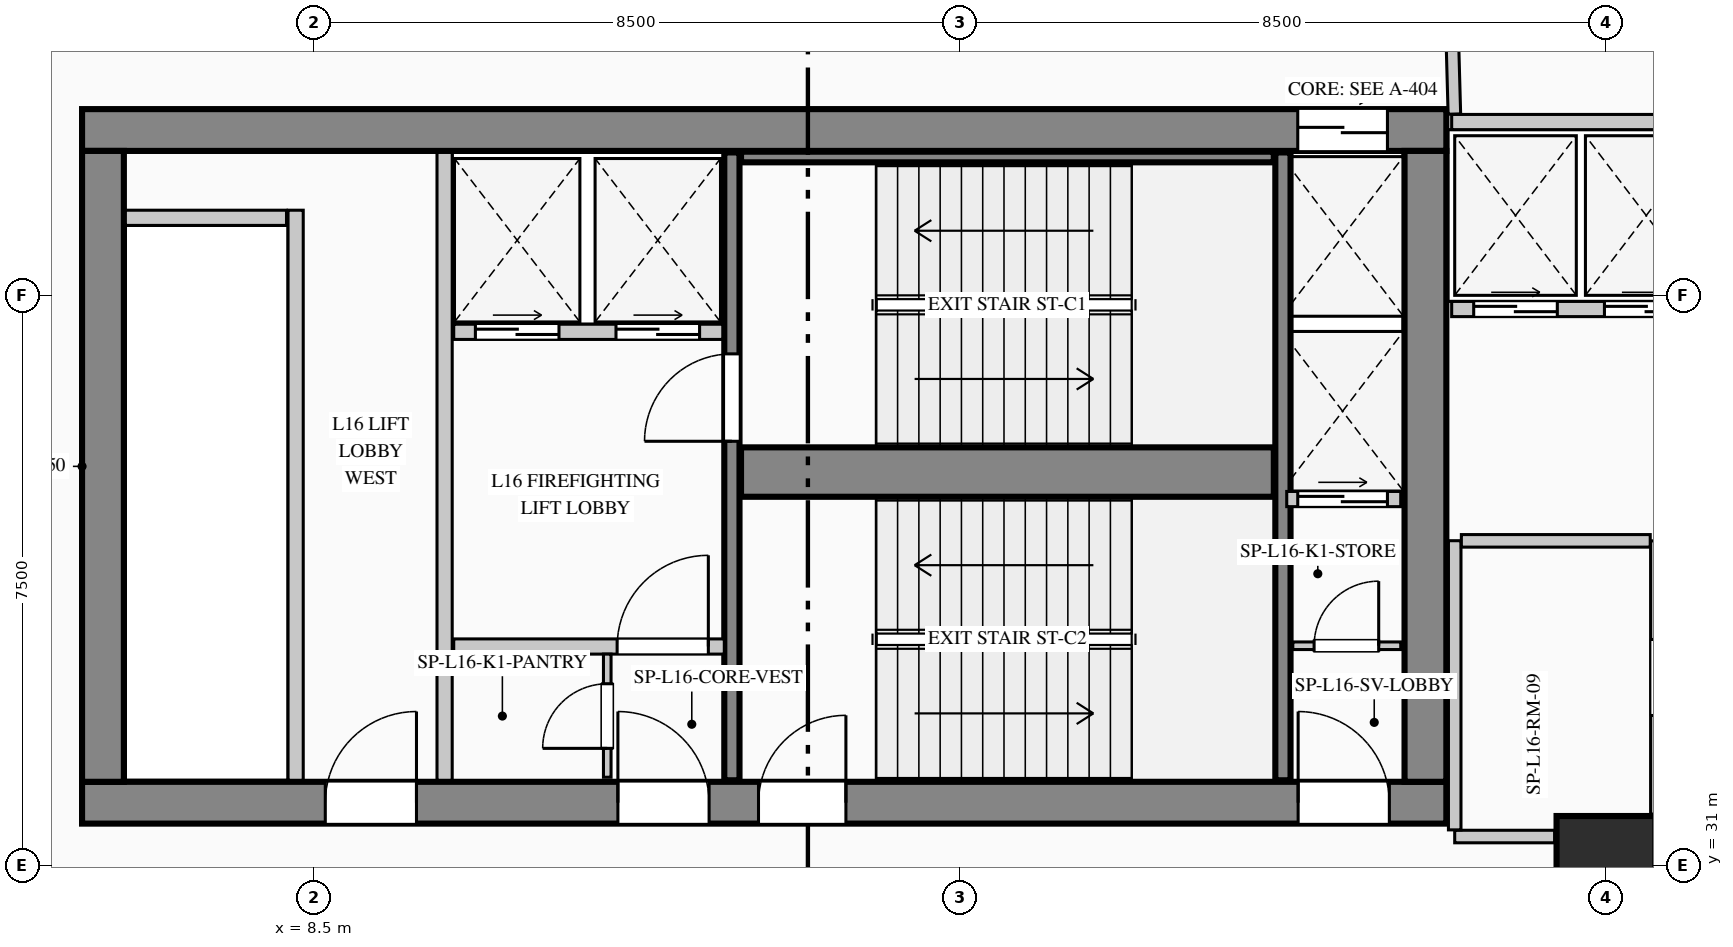
"""IFC4 building model, lengths in metres.
Left out: names, types, materials, properties, quantities, classifications, styles, units other than length and angle.
Written with IfcOpenShell. Run it as: python <this file> out.ifc"""

import sys

from ifc_helpers import new_model, si_unit, direction, frame, frame_2d, origin, origin_2d, place, context, subcontext, project, spatial, rectangle, extrude, element, fill, save


model = new_model("IFC4")
c1 = context("Model", 3, precision=1e-05, world=origin(), true_north=direction((0.0, 1.0)))
c2 = subcontext(c1, "Body", "Model", "MODEL_VIEW")
j1 = project(units=[si_unit("LENGTHUNIT", "METRE"), si_unit("PLANEANGLEUNIT", "RADIAN")], contexts=[c1])
p1 = place(None, origin())
s1 = spatial("IfcSite", under=j1, at=p1, CompositionType="ELEMENT")
p2 = place(p1, origin())
s2 = spatial("IfcBuilding", under=s1, at=p2, CompositionType="ELEMENT")
p3 = place(p2, frame((0.0, 0.0, 71.0)))
s3 = spatial("IfcBuildingStorey", under=s2, at=p3, CompositionType="ELEMENT", Elevation=71.0)
p4 = place(p3, frame((5.45, 40.675, 0.0), z_axis=(0.0, 0.0, 1.0), x_axis=(1.0, 0.0, 0.0)))
e1 = element("IfcWall", 1, at=p4, inside=s3, PredefinedType="SHEAR", context=c2, shape_type="SweptSolid", body=[
    extrude(rectangle(XDim=17.95, YDim=0.55, at=frame_2d((8.975, 0.0))), origin(), (0.0, 0.0, 1.0), 4.4),
])
p5 = place(p4, frame((15.995, 0.0, 0.0)))
e2 = element("IfcOpeningElement", 2, at=p5, cuts=e1, PredefinedType="OPENING", context=c2, shape_type="SweptSolid", body=[
    extrude(rectangle(XDim=1.18, YDim=2.25, at=frame_2d((0.59, 1.125))), frame((0.0, 0.285, 0.0), z_axis=(0.0, -1.0, 0.0), x_axis=(1.0, 0.0, 0.0)), (0.0, 0.0, 1.0), 0.57),
])
p6 = place(p3, frame((5.45, 31.825, 0.0), z_axis=(0.0, 0.0, 1.0), x_axis=(1.0, 0.0, 0.0)))
e3 = element("IfcWall", 3, at=p6, inside=s3, PredefinedType="SHEAR", context=c2, shape_type="SweptSolid", body=[
    extrude(rectangle(XDim=17.95, YDim=0.55, at=frame_2d((8.975, 0.0))), origin(), (0.0, 0.0, 1.0), 4.4),
])
p7 = place(p6, frame((3.2, 0.0, 0.0)))
e4 = element("IfcOpeningElement", 4, at=p7, cuts=e3, PredefinedType="OPENING", context=c2, shape_type="SweptSolid", body=[
    extrude(rectangle(XDim=1.2, YDim=2.2, at=frame_2d((0.6, 1.1))), frame((0.0, 0.285, 0.0), z_axis=(0.0, -1.0, 0.0), x_axis=(1.0, 0.0, 0.0)), (0.0, 0.0, 1.0), 0.57),
])
p8 = place(p6, frame((7.05, 0.0, 0.0)))
e5 = element("IfcOpeningElement", 5, at=p8, cuts=e3, PredefinedType="OPENING", context=c2, shape_type="SweptSolid", body=[
    extrude(rectangle(XDim=1.2, YDim=2.2, at=frame_2d((0.6, 1.1))), frame((0.0, 0.285, 0.0), z_axis=(0.0, -1.0, 0.0), x_axis=(1.0, 0.0, 0.0)), (0.0, 0.0, 1.0), 0.57),
])
p9 = place(p6, frame((8.9, 0.0, 0.0)))
e6 = element("IfcOpeningElement", 6, at=p9, cuts=e3, PredefinedType="OPENING", context=c2, shape_type="SweptSolid", body=[
    extrude(rectangle(XDim=1.15, YDim=2.2, at=frame_2d((0.575, 1.1))), frame((0.0, 0.285, 0.0), z_axis=(0.0, -1.0, 0.0), x_axis=(1.0, 0.0, 0.0)), (0.0, 0.0, 1.0), 0.57),
])
p10 = place(p6, frame((16.0, 0.0, 0.0)))
e7 = element("IfcOpeningElement", 7, at=p10, cuts=e3, PredefinedType="OPENING", context=c2, shape_type="SweptSolid", body=[
    extrude(rectangle(XDim=1.2, YDim=2.2, at=frame_2d((0.6, 1.1))), frame((0.0, 0.285, 0.0), z_axis=(0.0, -1.0, 0.0), x_axis=(1.0, 0.0, 0.0)), (0.0, 0.0, 1.0), 0.57),
])
for number, where, z_axis, x_axis in (
    (8, (5.725, 32.1, 0.0), (0.0, 0.0, 1.0), (0.0, 1.0, 0.0)),
    (9, (23.125, 32.1, 0.0), (0.0, 0.0, 1.0), (0.0, 1.0, 0.0)),
):
    element("IfcWall", number, at=place(p3, frame(where, z_axis=z_axis, x_axis=x_axis)), inside=s3, PredefinedType="SHEAR", context=c2, shape_type="SweptSolid", body=[
        extrude(rectangle(XDim=8.3, YDim=0.55, at=frame_2d((4.15, 0.0))), origin(), (0.0, 0.0, 1.0), 4.4),
    ])
p11 = place(p3, frame((14.0, 32.12, 0.0), z_axis=(0.0, 0.0, 1.0), x_axis=(0.0, 1.0, 0.0)))
e10 = element("IfcWall", 10, at=p11, inside=s3, PredefinedType="SHEAR", context=c2, shape_type="SweptSolid", body=[
    extrude(rectangle(XDim=8.26, YDim=0.2, at=frame_2d((4.13, 0.0))), origin(), (0.0, 0.0, 1.0), 4.4),
])
p12 = place(p11, frame((4.46, 0.0, 0.0)))
e11 = element("IfcOpeningElement", 11, at=p12, cuts=e10, PredefinedType="OPENING", context=c2, shape_type="SweptSolid", body=[
    extrude(rectangle(XDim=1.15, YDim=2.2, at=frame_2d((0.575, 1.1))), frame((0.0, 0.11, 0.0), z_axis=(0.0, -1.0, 0.0), x_axis=(1.0, 0.0, 0.0)), (0.0, 0.0, 1.0), 0.22),
])
p13 = place(p3, frame((14.12, 36.175, 0.0), z_axis=(0.0, 0.0, 1.0), x_axis=(1.0, 0.0, 0.0)))
e12 = element("IfcWall", 12, at=p13, inside=s3, PredefinedType="SHEAR", context=c2, shape_type="SweptSolid", body=[
    extrude(rectangle(XDim=7.01, YDim=0.65, at=frame_2d((3.505, 0.0))), origin(), (0.0, 0.0, 1.0), 4.4),
])
p14 = place(p3, frame((21.25, 32.12, 0.0), z_axis=(0.0, 0.0, 1.0), x_axis=(0.0, 1.0, 0.0)))
e13 = element("IfcWall", 13, at=p14, inside=s3, PredefinedType="SHEAR", context=c2, shape_type="SweptSolid", body=[
    extrude(rectangle(XDim=8.26, YDim=0.2, at=frame_2d((4.13, 0.0))), origin(), (0.0, 0.0, 1.0), 4.4),
])
p15 = place(p3, frame((14.12, 40.32, 0.0), z_axis=(0.0, 0.0, 1.0), x_axis=(1.0, 0.0, 0.0)))
e14 = element("IfcWall", 14, at=p15, inside=s3, PredefinedType="SHEAR", context=c2, shape_type="SweptSolid", body=[
    extrude(rectangle(XDim=7.01, YDim=0.14, at=frame_2d((3.505, 0.0))), origin(), (0.0, 0.0, 1.0), 4.4),
])
p16 = place(p3, frame((25.5, 31.0, 0.0), z_axis=(0.0, 0.0, 1.0), x_axis=(1.0, 0.0, 0.0)))
e15 = element("IfcColumn", 15, at=p16, inside=s3, PredefinedType="COLUMN", context=c2, shape_type="SweptSolid", body=[
    extrude(rectangle(XDim=1.3, YDim=1.3, at=origin_2d()), origin(), (0.0, 0.0, 1.0), 4.4),
])
p17 = place(p3, frame((8.523, 4.84, 0.0), z_axis=(0.0, 0.0, 1.0), x_axis=(-0.150394554312, 0.988626055712, 0.0)))
e16 = element("IfcWall", 16, at=p17, inside=s3, PredefinedType="STANDARD", context=c2, shape_type="SweptSolid", body=[
    extrude(rectangle(XDim=36.738, YDim=0.28, at=frame_2d((18.369, 0.0))), origin(), (0.0, 0.0, 1.0), 4.1),
])
p18 = place(p17, frame((22.612, 0.0, 0.9)))
e17 = element("IfcOpeningElement", 17, at=p18, cuts=e16, PredefinedType="OPENING", context=c2, shape_type="SweptSolid", body=[
    extrude(rectangle(XDim=1.8, YDim=2.1, at=frame_2d((0.9, 1.05))), frame((0.0, 0.15, 0.0), z_axis=(0.0, -1.0, 0.0), x_axis=(1.0, 0.0, 0.0)), (0.0, 0.0, 1.0), 0.3),
])
p19 = place(p3, frame((8.26, 32.12, 0.0), z_axis=(0.0, 0.0, 1.0), x_axis=(0.0, 1.0, 0.0)))
e18 = element("IfcWall", 18, at=p19, inside=s3, PredefinedType="PARTITIONING", context=c2, shape_type="SweptSolid", body=[
    extrude(rectangle(XDim=7.5, YDim=0.2, at=frame_2d((3.75, 0.0))), origin(), (0.0, 0.0, 1.0), 4.1),
])
p20 = place(p3, frame((6.02, 39.52, 0.0), z_axis=(0.0, 0.0, 1.0), x_axis=(1.0, 0.0, 0.0)))
e19 = element("IfcWall", 19, at=p20, inside=s3, PredefinedType="PARTITIONING", context=c2, shape_type="SweptSolid", body=[
    extrude(rectangle(XDim=2.12, YDim=0.2, at=frame_2d((1.06, 0.0))), origin(), (0.0, 0.0, 1.0), 4.1),
])
p21 = place(p3, frame((10.22, 32.12, 0.0), z_axis=(0.0, 0.0, 1.0), x_axis=(0.0, 1.0, 0.0)))
e20 = element("IfcWall", 20, at=p21, inside=s3, PredefinedType="PARTITIONING", context=c2, shape_type="SweptSolid", body=[
    extrude(rectangle(XDim=8.26, YDim=0.2, at=frame_2d((4.13, 0.0))), origin(), (0.0, 0.0, 1.0), 4.1),
])
p22 = place(p3, frame((10.34, 38.02, 0.0), z_axis=(0.0, 0.0, 1.0), x_axis=(1.0, 0.0, 0.0)))
e21 = element("IfcWall", 21, at=p22, inside=s3, PredefinedType="PARTITIONING", context=c2, shape_type="SweptSolid", body=[
    extrude(rectangle(XDim=3.54, YDim=0.2, at=frame_2d((1.77, 0.0))), origin(), (0.0, 0.0, 1.0), 4.1),
])
p23 = place(p22, frame((0.285, 0.0, 0.0)))
e22 = element("IfcOpeningElement", 22, at=p23, cuts=e21, PredefinedType="OPENING", context=c2, shape_type="SweptSolid", body=[
    extrude(rectangle(XDim=1.1, YDim=2.2, at=frame_2d((0.55, 1.1))), frame((0.0, 0.11, 0.0), z_axis=(0.0, -1.0, 0.0), x_axis=(1.0, 0.0, 0.0)), (0.0, 0.0, 1.0), 0.22),
])
p24 = place(p22, frame((2.135, 0.0, 0.0)))
e23 = element("IfcOpeningElement", 23, at=p24, cuts=e21, PredefinedType="OPENING", context=c2, shape_type="SweptSolid", body=[
    extrude(rectangle(XDim=1.1, YDim=2.2, at=frame_2d((0.55, 1.1))), frame((0.0, 0.11, 0.0), z_axis=(0.0, -1.0, 0.0), x_axis=(1.0, 0.0, 0.0)), (0.0, 0.0, 1.0), 0.22),
])
p25 = place(p3, frame((10.34, 33.88, 0.0), z_axis=(0.0, 0.0, 1.0), x_axis=(1.0, 0.0, 0.0)))
e24 = element("IfcWall", 24, at=p25, inside=s3, PredefinedType="PARTITIONING", context=c2, shape_type="SweptSolid", body=[
    extrude(rectangle(XDim=3.56, YDim=0.2, at=frame_2d((1.78, 0.0))), origin(), (0.0, 0.0, 1.0), 4.1),
])
p26 = place(p25, frame((2.15, 0.0, 0.0)))
e25 = element("IfcOpeningElement", 25, at=p26, cuts=e24, PredefinedType="OPENING", context=c2, shape_type="SweptSolid", body=[
    extrude(rectangle(XDim=1.2, YDim=2.2, at=frame_2d((0.6, 1.1))), frame((0.0, 0.11, 0.0), z_axis=(0.0, -1.0, 0.0), x_axis=(1.0, 0.0, 0.0)), (0.0, 0.0, 1.0), 0.22),
])
p27 = place(p3, frame((12.36, 32.16, 0.0), z_axis=(0.0, 0.0, 1.0), x_axis=(0.0, 1.0, 0.0)))
e26 = element("IfcWall", 26, at=p27, inside=s3, PredefinedType="PARTITIONING", context=c2, shape_type="SweptSolid", body=[
    extrude(rectangle(XDim=1.62, YDim=0.1, at=frame_2d((0.81, 0.0))), origin(), (0.0, 0.0, 1.0), 4.1),
])
p28 = place(p27, frame((0.38, 0.0, 0.0)))
e27 = element("IfcOpeningElement", 27, at=p28, cuts=e26, PredefinedType="OPENING", context=c2, shape_type="SweptSolid", body=[
    extrude(rectangle(XDim=0.85, YDim=2.1, at=frame_2d((0.425, 1.05))), frame((0.0, 0.06, 0.0), z_axis=(0.0, -1.0, 0.0), x_axis=(1.0, 0.0, 0.0)), (0.0, 0.0, 1.0), 0.12),
])
p29 = place(p3, frame((21.38, 33.89, 0.0), z_axis=(0.0, 0.0, 1.0), x_axis=(1.0, 0.0, 0.0)))
e28 = element("IfcWall", 28, at=p29, inside=s3, PredefinedType="PARTITIONING", context=c2, shape_type="SweptSolid", body=[
    extrude(rectangle(XDim=1.42, YDim=0.1, at=frame_2d((0.71, 0.0))), origin(), (0.0, 0.0, 1.0), 4.1),
])
p30 = place(p29, frame((0.28, 0.0, 0.0)))
e29 = element("IfcOpeningElement", 29, at=p30, cuts=e28, PredefinedType="OPENING", context=c2, shape_type="SweptSolid", body=[
    extrude(rectangle(XDim=0.85, YDim=2.1, at=frame_2d((0.425, 1.05))), frame((0.0, 0.06, 0.0), z_axis=(0.0, -1.0, 0.0), x_axis=(1.0, 0.0, 0.0)), (0.0, 0.0, 1.0), 0.12),
])
p31 = place(p3, frame((21.3, 35.82, 0.0), z_axis=(0.0, 0.0, 1.0), x_axis=(1.0, 0.0, 0.0)))
e30 = element("IfcWall", 30, at=p31, inside=s3, PredefinedType="PARTITIONING", context=c2, shape_type="SweptSolid", body=[
    extrude(rectangle(XDim=1.5, YDim=0.2, at=frame_2d((0.75, 0.0))), origin(), (0.0, 0.0, 1.0), 4.1),
])
p32 = place(p31, frame((0.145, 0.0, 0.0)))
e31 = element("IfcOpeningElement", 31, at=p32, cuts=e30, PredefinedType="OPENING", context=c2, shape_type="SweptSolid", body=[
    extrude(rectangle(XDim=1.18, YDim=2.25, at=frame_2d((0.59, 1.125))), frame((0.0, 0.11, 0.0), z_axis=(0.0, -1.0, 0.0), x_axis=(1.0, 0.0, 0.0)), (0.0, 0.0, 1.0), 0.22),
])
p33 = place(p3, frame((23.47, 40.78, 0.0), z_axis=(0.0, 0.0, 1.0), x_axis=(1.0, 0.0, 0.0)))
e32 = element("IfcWall", 32, at=p33, inside=s3, PredefinedType="PARTITIONING", context=c2, shape_type="SweptSolid", body=[
    extrude(rectangle(XDim=6.91, YDim=0.2, at=frame_2d((3.455, 0.0))), origin(), (0.0, 0.0, 1.0), 4.1),
])
p34 = place(p3, frame((23.47, 38.32, 0.0), z_axis=(0.0, 0.0, 1.0), x_axis=(1.0, 0.0, 0.0)))
e33 = element("IfcWall", 33, at=p34, inside=s3, PredefinedType="PARTITIONING", context=c2, shape_type="SweptSolid", body=[
    extrude(rectangle(XDim=6.79, YDim=0.2, at=frame_2d((3.395, 0.0))), origin(), (0.0, 0.0, 1.0), 4.1),
])
p35 = place(p34, frame((0.29, 0.0, 0.0)))
e34 = element("IfcOpeningElement", 34, at=p35, cuts=e33, PredefinedType="OPENING", context=c2, shape_type="SweptSolid", body=[
    extrude(rectangle(XDim=1.1, YDim=2.2, at=frame_2d((0.55, 1.1))), frame((0.0, 0.11, 0.0), z_axis=(0.0, -1.0, 0.0), x_axis=(1.0, 0.0, 0.0)), (0.0, 0.0, 1.0), 0.22),
])
p36 = place(p34, frame((2.01, 0.0, 0.0)))
e35 = element("IfcOpeningElement", 35, at=p36, cuts=e33, PredefinedType="OPENING", context=c2, shape_type="SweptSolid", body=[
    extrude(rectangle(XDim=1.1, YDim=2.2, at=frame_2d((0.55, 1.1))), frame((0.0, 0.11, 0.0), z_axis=(0.0, -1.0, 0.0), x_axis=(1.0, 0.0, 0.0)), (0.0, 0.0, 1.0), 0.22),
])
p37 = place(p34, frame((3.73, 0.0, 0.0)))
e36 = element("IfcOpeningElement", 36, at=p37, cuts=e33, PredefinedType="OPENING", context=c2, shape_type="SweptSolid", body=[
    extrude(rectangle(XDim=1.1, YDim=2.2, at=frame_2d((0.55, 1.1))), frame((0.0, 0.11, 0.0), z_axis=(0.0, -1.0, 0.0), x_axis=(1.0, 0.0, 0.0)), (0.0, 0.0, 1.0), 0.22),
])
p38 = place(p34, frame((5.45, 0.0, 0.0)))
e37 = element("IfcOpeningElement", 37, at=p38, cuts=e33, PredefinedType="OPENING", context=c2, shape_type="SweptSolid", body=[
    extrude(rectangle(XDim=1.1, YDim=2.2, at=frame_2d((0.55, 1.1))), frame((0.0, 0.11, 0.0), z_axis=(0.0, -1.0, 0.0), x_axis=(1.0, 0.0, 0.0)), (0.0, 0.0, 1.0), 0.22),
])
p39 = place(p3, frame((26.17, 35.27, 0.0), z_axis=(0.0, 0.0, 1.0), x_axis=(0.0, -1.0, 0.0)))
e38 = element("IfcWall", 38, at=p39, inside=s3, PredefinedType="PARTITIONING", context=c2, shape_type="SweptSolid", body=[
    extrude(rectangle(XDim=3.595, YDim=0.165, at=frame_2d((1.797, 0.0))), origin(), (0.0, 0.0, 1.0), 4.1),
])
p40 = place(p39, frame((1.298, 0.0, 0.0)))
e39 = element("IfcOpeningElement", 39, at=p40, cuts=e38, PredefinedType="OPENING", context=c2, shape_type="SweptSolid", body=[
    extrude(rectangle(XDim=1.0, YDim=2.15, at=frame_2d((0.5, 1.075))), frame((0.0, 0.093, 0.0), z_axis=(0.0, -1.0, 0.0), x_axis=(1.0, 0.0, 0.0)), (0.0, 0.0, 1.0), 0.185),
])
p41 = place(p3, frame((24.825, 31.38, 0.0), z_axis=(0.0, 0.0, 1.0), x_axis=(-1.0, 0.0, 0.0)))
e40 = element("IfcWall", 40, at=p41, inside=s3, PredefinedType="PARTITIONING", context=c2, shape_type="SweptSolid", body=[
    extrude(rectangle(XDim=1.315, YDim=0.165, at=frame_2d((0.657, 0.0))), origin(), (0.0, 0.0, 1.0), 4.1),
])
p42 = place(p3, frame((23.51, 31.468, 0.0), z_axis=(0.0, 0.0, 1.0), x_axis=(0.0, 1.0, 0.0)))
e41 = element("IfcWall", 41, at=p42, inside=s3, PredefinedType="PARTITIONING", context=c2, shape_type="SweptSolid", body=[
    extrude(rectangle(XDim=3.804, YDim=0.165, at=frame_2d((1.902, 0.0))), origin(), (0.0, 0.0, 1.0), 4.1),
])
p43 = place(p3, frame((23.597, 35.27, 0.0), z_axis=(0.0, 0.0, 1.0), x_axis=(1.0, 0.0, 0.0)))
e42 = element("IfcWall", 42, at=p43, inside=s3, PredefinedType="PARTITIONING", context=c2, shape_type="SweptSolid", body=[
    extrude(rectangle(XDim=2.485, YDim=0.165, at=frame_2d((1.243, 0.0))), origin(), (0.0, 0.0, 1.0), 4.1),
])
p44 = place(p3, frame((23.506, 40.885, 0.0), z_axis=(0.0, 0.0, 1.0), x_axis=(-0.027441464163, 0.999623412113, 0.0)))
e43 = element("IfcWall", 43, at=p44, inside=s3, PredefinedType="PARTITIONING", context=c2, shape_type="SweptSolid", body=[
    extrude(rectangle(XDim=2.331, YDim=0.165, at=frame_2d((1.166, 0.0))), origin(), (0.0, 0.0, 1.0), 4.1),
])
p45 = place(p7, origin())
e44 = element("IfcDoor", 44, at=p45, inside=s3, OperationType="SINGLE_SWING_RIGHT", PredefinedType="DOOR", context=c2, shape_type="SweptSolid", body=[
    extrude(rectangle(XDim=1.2, YDim=2.2, at=frame_2d((0.6, 1.1))), frame((0.0, 0.025, 0.0), z_axis=(0.0, -1.0, 0.0), x_axis=(1.0, 0.0, 0.0)), (0.0, 0.0, 1.0), 0.05),
])
fill(e4, e44)
p46 = place(p8, origin())
e45 = element("IfcDoor", 45, at=p46, inside=s3, OperationType="SINGLE_SWING_LEFT", PredefinedType="DOOR", context=c2, shape_type="SweptSolid", body=[
    extrude(rectangle(XDim=1.2, YDim=2.2, at=frame_2d((0.6, 1.1))), frame((0.0, 0.025, 0.0), z_axis=(0.0, -1.0, 0.0), x_axis=(1.0, 0.0, 0.0)), (0.0, 0.0, 1.0), 0.05),
])
fill(e5, e45)
p47 = place(p9, origin())
e46 = element("IfcDoor", 46, at=p47, inside=s3, OperationType="SINGLE_SWING_RIGHT", PredefinedType="DOOR", context=c2, shape_type="SweptSolid", body=[
    extrude(rectangle(XDim=1.15, YDim=2.2, at=frame_2d((0.575, 1.1))), frame((0.0, 0.025, 0.0), z_axis=(0.0, -1.0, 0.0), x_axis=(1.0, 0.0, 0.0)), (0.0, 0.0, 1.0), 0.05),
])
fill(e6, e46)
p48 = place(p10, origin())
e47 = element("IfcDoor", 47, at=p48, inside=s3, OperationType="SINGLE_SWING_LEFT", PredefinedType="DOOR", context=c2, shape_type="SweptSolid", body=[
    extrude(rectangle(XDim=1.2, YDim=2.2, at=frame_2d((0.6, 1.1))), frame((0.0, 0.025, 0.0), z_axis=(0.0, -1.0, 0.0), x_axis=(1.0, 0.0, 0.0)), (0.0, 0.0, 1.0), 0.05),
])
fill(e7, e47)
p49 = place(p26, origin())
e48 = element("IfcDoor", 48, at=p49, inside=s3, OperationType="SINGLE_SWING_RIGHT", PredefinedType="DOOR", context=c2, shape_type="SweptSolid", body=[
    extrude(rectangle(XDim=1.2, YDim=2.2, at=frame_2d((0.6, 1.1))), frame((0.0, 0.025, 0.0), z_axis=(0.0, -1.0, 0.0), x_axis=(1.0, 0.0, 0.0)), (0.0, 0.0, 1.0), 0.05),
])
fill(e25, e48)
p50 = place(p28, origin())
e49 = element("IfcDoor", 49, at=p50, inside=s3, OperationType="SINGLE_SWING_LEFT", PredefinedType="DOOR", context=c2, shape_type="SweptSolid", body=[
    extrude(rectangle(XDim=0.85, YDim=2.1, at=frame_2d((0.425, 1.05))), frame((0.0, 0.025, 0.0), z_axis=(0.0, -1.0, 0.0), x_axis=(1.0, 0.0, 0.0)), (0.0, 0.0, 1.0), 0.05),
])
fill(e27, e49)
p51 = place(p30, origin())
e50 = element("IfcDoor", 50, at=p51, inside=s3, OperationType="SINGLE_SWING_RIGHT", PredefinedType="DOOR", context=c2, shape_type="SweptSolid", body=[
    extrude(rectangle(XDim=0.85, YDim=2.1, at=frame_2d((0.425, 1.05))), frame((0.0, 0.025, 0.0), z_axis=(0.0, -1.0, 0.0), x_axis=(1.0, 0.0, 0.0)), (0.0, 0.0, 1.0), 0.05),
])
fill(e29, e50)
p52 = place(p12, origin())
e51 = element("IfcDoor", 51, at=p52, inside=s3, OperationType="SINGLE_SWING_LEFT", PredefinedType="DOOR", context=c2, shape_type="SweptSolid", body=[
    extrude(rectangle(XDim=1.15, YDim=2.2, at=frame_2d((0.575, 1.1))), frame((0.0, 0.025, 0.0), z_axis=(0.0, -1.0, 0.0), x_axis=(1.0, 0.0, 0.0)), (0.0, 0.0, 1.0), 0.05),
])
fill(e11, e51)
p53 = place(p23, origin())
e52 = element("IfcDoor", 52, at=p53, inside=s3, OperationType="DOUBLE_DOOR_SLIDING", PredefinedType="DOOR", context=c2, shape_type="SweptSolid", body=[
    extrude(rectangle(XDim=1.1, YDim=2.2, at=frame_2d((0.55, 1.1))), frame((0.0, 0.025, 0.0), z_axis=(0.0, -1.0, 0.0), x_axis=(1.0, 0.0, 0.0)), (0.0, 0.0, 1.0), 0.05),
])
fill(e22, e52)
p54 = place(p24, origin())
e53 = element("IfcDoor", 53, at=p54, inside=s3, OperationType="DOUBLE_DOOR_SLIDING", PredefinedType="DOOR", context=c2, shape_type="SweptSolid", body=[
    extrude(rectangle(XDim=1.1, YDim=2.2, at=frame_2d((0.55, 1.1))), frame((0.0, 0.025, 0.0), z_axis=(0.0, -1.0, 0.0), x_axis=(1.0, 0.0, 0.0)), (0.0, 0.0, 1.0), 0.05),
])
fill(e23, e53)
p55 = place(p5, origin())
e54 = element("IfcDoor", 54, at=p55, inside=s3, OperationType="DOUBLE_DOOR_SLIDING", PredefinedType="DOOR", context=c2, shape_type="SweptSolid", body=[
    extrude(rectangle(XDim=1.18, YDim=2.25, at=frame_2d((0.59, 1.125))), frame((0.0, 0.025, 0.0), z_axis=(0.0, -1.0, 0.0), x_axis=(1.0, 0.0, 0.0)), (0.0, 0.0, 1.0), 0.05),
])
fill(e2, e54)
p56 = place(p32, origin())
e55 = element("IfcDoor", 55, at=p56, inside=s3, OperationType="DOUBLE_DOOR_SLIDING", PredefinedType="DOOR", context=c2, shape_type="SweptSolid", body=[
    extrude(rectangle(XDim=1.18, YDim=2.25, at=frame_2d((0.59, 1.125))), frame((0.0, 0.025, 0.0), z_axis=(0.0, -1.0, 0.0), x_axis=(1.0, 0.0, 0.0)), (0.0, 0.0, 1.0), 0.05),
])
fill(e31, e55)
p57 = place(p35, origin())
e56 = element("IfcDoor", 56, at=p57, inside=s3, OperationType="DOUBLE_DOOR_SLIDING", PredefinedType="DOOR", context=c2, shape_type="SweptSolid", body=[
    extrude(rectangle(XDim=1.1, YDim=2.2, at=frame_2d((0.55, 1.1))), frame((0.0, 0.025, 0.0), z_axis=(0.0, -1.0, 0.0), x_axis=(1.0, 0.0, 0.0)), (0.0, 0.0, 1.0), 0.05),
])
fill(e34, e56)
p58 = place(p36, origin())
e57 = element("IfcDoor", 57, at=p58, inside=s3, OperationType="DOUBLE_DOOR_SLIDING", PredefinedType="DOOR", context=c2, shape_type="SweptSolid", body=[
    extrude(rectangle(XDim=1.1, YDim=2.2, at=frame_2d((0.55, 1.1))), frame((0.0, 0.025, 0.0), z_axis=(0.0, -1.0, 0.0), x_axis=(1.0, 0.0, 0.0)), (0.0, 0.0, 1.0), 0.05),
])
fill(e35, e57)
save(model, sys.argv[1])
